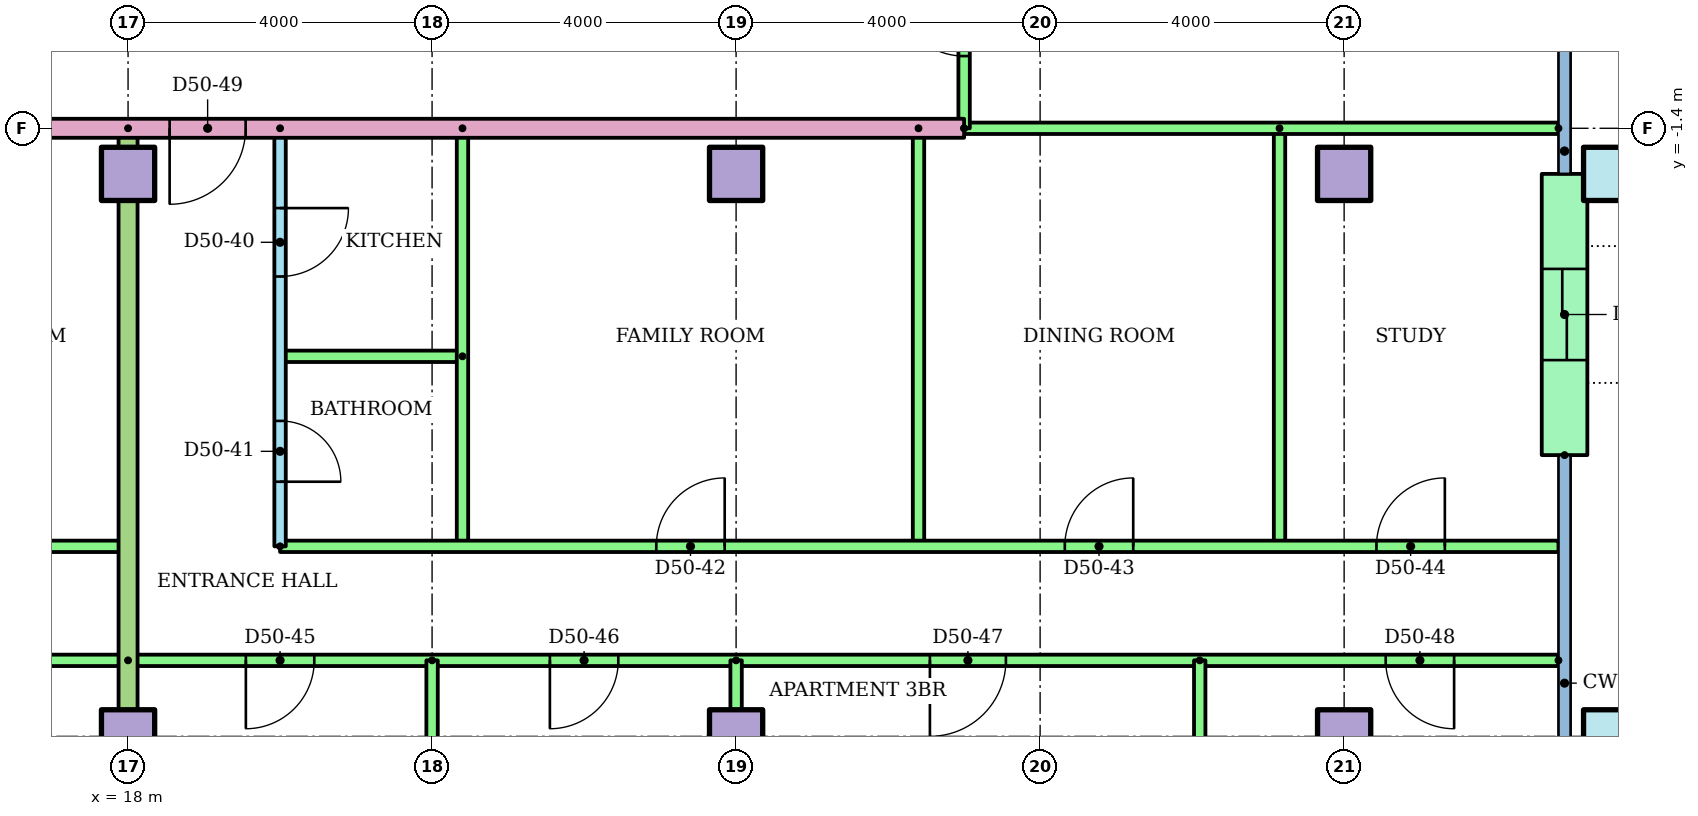
"""IFC4 building model, lengths in metres.
Left out: names, types, materials, properties, quantities, classifications, styles, units other than length and angle.
Written with IfcOpenShell. Run it as: python <this file> out.ifc"""

import sys

from ifc_helpers import new_model, si_unit, direction, frame, frame_2d, origin, origin_2d, place, context, subcontext, project, spatial, rectangle, hollow_rectangle, extrude, element, fill, save


model = new_model("IFC4")
c1 = context("Model", 3, precision=1e-05, world=origin(), true_north=direction((0.0, 1.0)))
c2 = subcontext(c1, "Body", "Model", "MODEL_VIEW")
j1 = project(units=[si_unit("LENGTHUNIT", "METRE"), si_unit("PLANEANGLEUNIT", "RADIAN")], contexts=[c1])
p1 = place(None, origin())
s1 = spatial("IfcSite", under=j1, at=p1, CompositionType="ELEMENT")
p2 = place(p1, origin())
s2 = spatial("IfcBuilding", under=s1, at=p2, CompositionType="ELEMENT")
p3 = place(p2, frame((0.0, 0.0, 190.9)))
s3 = spatial("IfcBuildingStorey", under=s2, at=p3, CompositionType="ELEMENT", Elevation=190.9)
for number, where in (
    (1, (18.0, -9.4, 0.0)),
    (2, (26.0, -9.4, 0.0)),
    (3, (34.0, -9.4, 0.0)),
):
    element("IfcColumn", number, at=place(p3, frame(where)), inside=s3, PredefinedType="COLUMN", context=c2, shape_type="SweptSolid", body=[
        extrude(rectangle(XDim=0.7, YDim=0.7, at=origin_2d()), origin(), (0.0, 0.0, 1.0), 3.2),
    ])
p4 = place(p3, frame((37.5, -9.4, 0.0)))
e4 = element("IfcColumn", 4, at=p4, inside=s3, PredefinedType="COLUMN", context=c2, shape_type="SweptSolid", body=[
    extrude(hollow_rectangle(XDim=0.7, YDim=0.7, WallThickness=0.036, at=origin_2d()), origin(), (0.0, 0.0, 1.0), 3.2),
])
for number, where in (
    (5, (18.0, -2.0, 0.0)),
    (6, (26.0, -2.0, 0.0)),
    (7, (34.0, -2.0, 0.0)),
):
    element("IfcColumn", number, at=place(p3, frame(where)), inside=s3, PredefinedType="COLUMN", context=c2, shape_type="SweptSolid", body=[
        extrude(rectangle(XDim=0.7, YDim=0.7, at=origin_2d()), origin(), (0.0, 0.0, 1.0), 3.2),
    ])
p5 = place(p3, frame((37.5, -2.0, 0.0)))
e8 = element("IfcColumn", 8, at=p5, inside=s3, PredefinedType="COLUMN", context=c2, shape_type="SweptSolid", body=[
    extrude(hollow_rectangle(XDim=0.7, YDim=0.7, WallThickness=0.036, at=origin_2d()), origin(), (0.0, 0.0, 1.0), 3.2),
])
p6 = place(p3, frame((36.9, -5.7, 0.0), z_axis=(0.0, 0.0, 1.0), x_axis=(0.0, 1.0, 0.0)))
e9 = element("IfcWall", 9, at=p6, inside=s3, PredefinedType="STANDARD", context=c2, shape_type="SweptSolid", body=[
    extrude(rectangle(XDim=3.7, YDim=0.6, at=frame_2d((1.85, 0.0))), origin(), (0.0, 0.0, 1.0), 2.8),
])
p7 = place(p6, frame((1.25, 0.0, 0.0)))
e10 = element("IfcOpeningElement", 10, at=p7, cuts=e9, PredefinedType="OPENING", context=c2, shape_type="SweptSolid", body=[
    extrude(rectangle(XDim=1.2, YDim=2.1, at=frame_2d((0.6, 1.05))), frame((0.0, 0.31, 0.0), z_axis=(0.0, -1.0, 0.0), x_axis=(1.0, 0.0, 0.0)), (0.0, 0.0, 1.0), 0.62),
])
p8 = place(p3, frame((12.0, -6.9, 0.0)))
e11 = element("IfcWall", 11, at=p8, inside=s3, PredefinedType="PARTITIONING", context=c2, shape_type="SweptSolid", body=[
    extrude(rectangle(XDim=6.0, YDim=0.15, at=frame_2d((3.0, 0.0))), origin(), (0.0, 0.0, 1.0), 2.4),
])
p9 = place(p8, frame((3.75, 0.0, 0.0)))
e12 = element("IfcOpeningElement", 12, at=p9, cuts=e11, PredefinedType="OPENING", context=c2, shape_type="SweptSolid", body=[
    extrude(rectangle(XDim=0.9, YDim=2.1, at=frame_2d((0.45, 1.05))), frame((0.0, 0.085, 0.0), z_axis=(0.0, -1.0, 0.0), x_axis=(1.0, 0.0, 0.0)), (0.0, 0.0, 1.0), 0.17),
])
p10 = place(p3, frame((18.0, -8.4, 0.0), z_axis=(0.0, 0.0, 1.0), x_axis=(-1.0, 0.0, 0.0)))
e13 = element("IfcWall", 13, at=p10, inside=s3, PredefinedType="PARTITIONING", context=c2, shape_type="SweptSolid", body=[
    extrude(rectangle(XDim=8.0, YDim=0.15, at=frame_2d((4.0, 0.0))), origin(), (0.0, 0.0, 1.0), 2.4),
])
p11 = place(p10, frame((5.5, 0.0, 0.0)))
e14 = element("IfcOpeningElement", 14, at=p11, cuts=e13, PredefinedType="OPENING", context=c2, shape_type="SweptSolid", body=[
    extrude(rectangle(XDim=1.0, YDim=2.1, at=frame_2d((0.5, 1.05))), frame((0.0, 0.085, 0.0), z_axis=(0.0, -1.0, 0.0), x_axis=(1.0, 0.0, 0.0)), (0.0, 0.0, 1.0), 0.17),
])
p12 = place(p10, frame((1.5, 0.0, 0.0)))
e15 = element("IfcOpeningElement", 15, at=p12, cuts=e13, PredefinedType="OPENING", context=c2, shape_type="SweptSolid", body=[
    extrude(rectangle(XDim=1.0, YDim=2.1, at=frame_2d((0.5, 1.05))), frame((0.0, 0.085, 0.0), z_axis=(0.0, -1.0, 0.0), x_axis=(1.0, 0.0, 0.0)), (0.0, 0.0, 1.0), 0.17),
])
p13 = place(p3, frame((20.0, -1.4, 0.0), z_axis=(0.0, 0.0, 1.0), x_axis=(0.0, -1.0, 0.0)))
e16 = element("IfcWall", 16, at=p13, inside=s3, PredefinedType="PARTITIONING", context=c2, shape_type="SweptSolid", body=[
    extrude(rectangle(XDim=5.5, YDim=0.15, at=frame_2d((2.75, 0.0))), origin(), (0.0, 0.0, 1.0), 2.4),
])
p14 = place(p13, frame((1.05, 0.0, 0.0)))
e17 = element("IfcOpeningElement", 17, at=p14, cuts=e16, PredefinedType="OPENING", context=c2, shape_type="SweptSolid", body=[
    extrude(rectangle(XDim=0.9, YDim=2.1, at=frame_2d((0.45, 1.05))), frame((0.0, 0.085, 0.0), z_axis=(0.0, -1.0, 0.0), x_axis=(1.0, 0.0, 0.0)), (0.0, 0.0, 1.0), 0.17),
])
p15 = place(p13, frame((3.85, 0.0, 0.0)))
e18 = element("IfcOpeningElement", 18, at=p15, cuts=e16, PredefinedType="OPENING", context=c2, shape_type="SweptSolid", body=[
    extrude(rectangle(XDim=0.8, YDim=2.1, at=frame_2d((0.4, 1.05))), frame((0.0, 0.085, 0.0), z_axis=(0.0, -1.0, 0.0), x_axis=(1.0, 0.0, 0.0)), (0.0, 0.0, 1.0), 0.17),
])
p16 = place(p3, frame((22.4, -4.4, 0.0), z_axis=(0.0, 0.0, 1.0), x_axis=(-1.0, 0.0, 0.0)))
e19 = element("IfcWall", 19, at=p16, inside=s3, PredefinedType="PARTITIONING", context=c2, shape_type="SweptSolid", body=[
    extrude(rectangle(XDim=2.4, YDim=0.15, at=frame_2d((1.2, 0.0))), origin(), (0.0, 0.0, 1.0), 2.4),
])
for number, where, z_axis, x_axis in (
    (20, (22.4, -1.4, 0.0), (0.0, 0.0, 1.0), (0.0, -1.0, 0.0)),
    (21, (28.4, -1.4, 0.0), (0.0, 0.0, 1.0), (0.0, -1.0, 0.0)),
    (22, (33.15, -1.4, 0.0), (0.0, 0.0, 1.0), (0.0, -1.0, 0.0)),
):
    element("IfcWall", number, at=place(p3, frame(where, z_axis=z_axis, x_axis=x_axis)), inside=s3, PredefinedType="PARTITIONING", context=c2, shape_type="SweptSolid", body=[
        extrude(rectangle(XDim=5.5, YDim=0.15, at=frame_2d((2.75, 0.0))), origin(), (0.0, 0.0, 1.0), 2.4),
    ])
p17 = place(p3, frame((20.0, -6.9, 0.0)))
e23 = element("IfcWall", 23, at=p17, inside=s3, PredefinedType="PARTITIONING", context=c2, shape_type="SweptSolid", body=[
    extrude(rectangle(XDim=16.82, YDim=0.15, at=frame_2d((8.41, 0.0))), origin(), (0.0, 0.0, 1.0), 2.4),
])
p18 = place(p17, frame((4.95, 0.0, 0.0)))
e24 = element("IfcOpeningElement", 24, at=p18, cuts=e23, PredefinedType="OPENING", context=c2, shape_type="SweptSolid", body=[
    extrude(rectangle(XDim=0.9, YDim=2.1, at=frame_2d((0.45, 1.05))), frame((0.0, 0.085, 0.0), z_axis=(0.0, -1.0, 0.0), x_axis=(1.0, 0.0, 0.0)), (0.0, 0.0, 1.0), 0.17),
])
p19 = place(p17, frame((10.325, 0.0, 0.0)))
e25 = element("IfcOpeningElement", 25, at=p19, cuts=e23, PredefinedType="OPENING", context=c2, shape_type="SweptSolid", body=[
    extrude(rectangle(XDim=0.9, YDim=2.1, at=frame_2d((0.45, 1.05))), frame((0.0, 0.085, 0.0), z_axis=(0.0, -1.0, 0.0), x_axis=(1.0, 0.0, 0.0)), (0.0, 0.0, 1.0), 0.17),
])
p20 = place(p17, frame((14.425, 0.0, 0.0)))
e26 = element("IfcOpeningElement", 26, at=p20, cuts=e23, PredefinedType="OPENING", context=c2, shape_type="SweptSolid", body=[
    extrude(rectangle(XDim=0.9, YDim=2.1, at=frame_2d((0.45, 1.05))), frame((0.0, 0.085, 0.0), z_axis=(0.0, -1.0, 0.0), x_axis=(1.0, 0.0, 0.0)), (0.0, 0.0, 1.0), 0.17),
])
p21 = place(p3, frame((36.82, -8.4, 0.0), z_axis=(0.0, 0.0, 1.0), x_axis=(-1.0, 0.0, 0.0)))
e27 = element("IfcWall", 27, at=p21, inside=s3, PredefinedType="PARTITIONING", context=c2, shape_type="SweptSolid", body=[
    extrude(rectangle(XDim=18.82, YDim=0.15, at=frame_2d((9.41, 0.0))), origin(), (0.0, 0.0, 1.0), 2.4),
])
p22 = place(p21, frame((16.37, 0.0, 0.0)))
e28 = element("IfcOpeningElement", 28, at=p22, cuts=e27, PredefinedType="OPENING", context=c2, shape_type="SweptSolid", body=[
    extrude(rectangle(XDim=0.9, YDim=2.1, at=frame_2d((0.45, 1.05))), frame((0.0, 0.085, 0.0), z_axis=(0.0, -1.0, 0.0), x_axis=(1.0, 0.0, 0.0)), (0.0, 0.0, 1.0), 0.17),
])
p23 = place(p21, frame((12.37, 0.0, 0.0)))
e29 = element("IfcOpeningElement", 29, at=p23, cuts=e27, PredefinedType="OPENING", context=c2, shape_type="SweptSolid", body=[
    extrude(rectangle(XDim=0.9, YDim=2.1, at=frame_2d((0.45, 1.05))), frame((0.0, 0.085, 0.0), z_axis=(0.0, -1.0, 0.0), x_axis=(1.0, 0.0, 0.0)), (0.0, 0.0, 1.0), 0.17),
])
p24 = place(p21, frame((7.27, 0.0, 0.0)))
e30 = element("IfcOpeningElement", 30, at=p24, cuts=e27, PredefinedType="OPENING", context=c2, shape_type="SweptSolid", body=[
    extrude(rectangle(XDim=1.0, YDim=2.1, at=frame_2d((0.5, 1.05))), frame((0.0, 0.085, 0.0), z_axis=(0.0, -1.0, 0.0), x_axis=(1.0, 0.0, 0.0)), (0.0, 0.0, 1.0), 0.17),
])
p25 = place(p21, frame((1.373, 0.0, 0.0)))
e31 = element("IfcOpeningElement", 31, at=p25, cuts=e27, PredefinedType="OPENING", context=c2, shape_type="SweptSolid", body=[
    extrude(rectangle(XDim=0.9, YDim=2.1, at=frame_2d((0.45, 1.05))), frame((0.0, 0.085, 0.0), z_axis=(0.0, -1.0, 0.0), x_axis=(1.0, 0.0, 0.0)), (0.0, 0.0, 1.0), 0.17),
])
p26 = place(p3, frame((22.0, -8.4, 0.0), z_axis=(0.0, 0.0, 1.0), x_axis=(0.0, -1.0, 0.0)))
e32 = element("IfcWall", 32, at=p26, inside=s3, PredefinedType="PARTITIONING", context=c2, shape_type="SweptSolid", body=[
    extrude(rectangle(XDim=8.021, YDim=0.15, at=frame_2d((4.01, 0.0))), origin(), (0.0, 0.0, 1.0), 2.4),
])
p27 = place(p3, frame((26.0, -8.4, 0.0), z_axis=(0.0, 0.0, 1.0), x_axis=(0.0, -1.0, 0.0)))
e33 = element("IfcWall", 33, at=p27, inside=s3, PredefinedType="PARTITIONING", context=c2, shape_type="SweptSolid", body=[
    extrude(rectangle(XDim=8.01, YDim=0.15, at=frame_2d((4.005, 0.0))), origin(), (0.0, 0.0, 1.0), 2.4),
])
p28 = place(p3, frame((32.1, -8.4, 0.0), z_axis=(0.0, 0.0, 1.0), x_axis=(0.0, -1.0, 0.0)))
e34 = element("IfcWall", 34, at=p28, inside=s3, PredefinedType="PARTITIONING", context=c2, shape_type="SweptSolid", body=[
    extrude(rectangle(XDim=6.22, YDim=0.15, at=frame_2d((3.11, 0.0))), origin(), (0.0, 0.0, 1.0), 2.4),
])
p29 = place(p3, frame((18.0, -1.4, 0.0), z_axis=(0.0, 0.0, 1.0), x_axis=(0.0, -1.0, 0.0)))
e35 = element("IfcWall", 35, at=p29, inside=s3, PredefinedType="PARTITIONING", context=c2, shape_type="SweptSolid", body=[
    extrude(rectangle(XDim=15.01, YDim=0.25, at=frame_2d((7.505, 0.0))), origin(), (0.0, 0.0, 1.0), 2.4),
])
p30 = place(p3, frame((29.0, -1.4, 0.0), z_axis=(0.0, 0.0, 1.0), x_axis=(-1.0, 0.0, 0.0)))
e36 = element("IfcWall", 36, at=p30, inside=s3, PredefinedType="PARTITIONING", context=c2, shape_type="SweptSolid", body=[
    extrude(rectangle(XDim=15.0, YDim=0.25, at=frame_2d((7.5, 0.0))), origin(), (0.0, 0.0, 1.0), 2.4),
])
p31 = place(p30, frame((9.453, 0.0, 0.0)))
e37 = element("IfcOpeningElement", 37, at=p31, cuts=e36, PredefinedType="OPENING", context=c2, shape_type="SweptSolid", body=[
    extrude(rectangle(XDim=1.0, YDim=2.1, at=frame_2d((0.5, 1.05))), frame((0.0, 0.135, 0.0), z_axis=(0.0, -1.0, 0.0), x_axis=(1.0, 0.0, 0.0)), (0.0, 0.0, 1.0), 0.27),
])
p32 = place(p3, frame((36.82, -1.4, 0.0), z_axis=(0.0, 0.0, 1.0), x_axis=(-1.0, 0.0, 0.0)))
e38 = element("IfcWall", 38, at=p32, inside=s3, PredefinedType="PARTITIONING", context=c2, shape_type="SweptSolid", body=[
    extrude(rectangle(XDim=7.82, YDim=0.15, at=frame_2d((3.91, 0.0))), origin(), (0.0, 0.0, 1.0), 2.4),
])
p33 = place(p3, frame((29.0, -1.4, 0.0), z_axis=(0.0, 0.0, 1.0), x_axis=(0.0, 1.0, 0.0)))
e39 = element("IfcWall", 39, at=p33, inside=s3, PredefinedType="PARTITIONING", context=c2, shape_type="SweptSolid", body=[
    extrude(rectangle(XDim=2.8, YDim=0.15, at=frame_2d((1.4, 0.0))), origin(), (0.0, 0.0, 1.0), 2.4),
])
p34 = place(p33, frame((0.95, 0.0, 0.0)))
e40 = element("IfcOpeningElement", 40, at=p34, cuts=e39, PredefinedType="OPENING", context=c2, shape_type="SweptSolid", body=[
    extrude(rectangle(XDim=0.9, YDim=2.1, at=frame_2d((0.45, 1.05))), frame((0.0, 0.085, 0.0), z_axis=(0.0, -1.0, 0.0), x_axis=(1.0, 0.0, 0.0)), (0.0, 0.0, 1.0), 0.17),
])
p35 = place(p14, origin())
e41 = element("IfcDoor", 41, at=p35, inside=s3, OperationType="SINGLE_SWING_LEFT", PredefinedType="DOOR", context=c2, shape_type="SweptSolid", body=[
    extrude(rectangle(XDim=0.9, YDim=2.1, at=frame_2d((0.45, 1.05))), frame((0.0, 0.025, 0.0), z_axis=(0.0, -1.0, 0.0), x_axis=(1.0, 0.0, 0.0)), (0.0, 0.0, 1.0), 0.05),
])
fill(e17, e41)
p36 = place(p15, origin())
e42 = element("IfcDoor", 42, at=p36, inside=s3, OperationType="SINGLE_SWING_RIGHT", PredefinedType="DOOR", context=c2, shape_type="SweptSolid", body=[
    extrude(rectangle(XDim=0.8, YDim=2.1, at=frame_2d((0.4, 1.05))), frame((0.0, 0.025, 0.0), z_axis=(0.0, -1.0, 0.0), x_axis=(1.0, 0.0, 0.0)), (0.0, 0.0, 1.0), 0.05),
])
fill(e18, e42)
p37 = place(p18, origin())
e43 = element("IfcDoor", 43, at=p37, inside=s3, OperationType="SINGLE_SWING_RIGHT", PredefinedType="DOOR", context=c2, shape_type="SweptSolid", body=[
    extrude(rectangle(XDim=0.9, YDim=2.1, at=frame_2d((0.45, 1.05))), frame((0.0, 0.025, 0.0), z_axis=(0.0, -1.0, 0.0), x_axis=(1.0, 0.0, 0.0)), (0.0, 0.0, 1.0), 0.05),
])
fill(e24, e43)
p38 = place(p19, origin())
e44 = element("IfcDoor", 44, at=p38, inside=s3, OperationType="SINGLE_SWING_RIGHT", PredefinedType="DOOR", context=c2, shape_type="SweptSolid", body=[
    extrude(rectangle(XDim=0.9, YDim=2.1, at=frame_2d((0.45, 1.05))), frame((0.0, 0.025, 0.0), z_axis=(0.0, -1.0, 0.0), x_axis=(1.0, 0.0, 0.0)), (0.0, 0.0, 1.0), 0.05),
])
fill(e25, e44)
p39 = place(p20, origin())
e45 = element("IfcDoor", 45, at=p39, inside=s3, OperationType="SINGLE_SWING_RIGHT", PredefinedType="DOOR", context=c2, shape_type="SweptSolid", body=[
    extrude(rectangle(XDim=0.9, YDim=2.1, at=frame_2d((0.45, 1.05))), frame((0.0, 0.025, 0.0), z_axis=(0.0, -1.0, 0.0), x_axis=(1.0, 0.0, 0.0)), (0.0, 0.0, 1.0), 0.05),
])
fill(e26, e45)
p40 = place(p22, origin())
e46 = element("IfcDoor", 46, at=p40, inside=s3, OperationType="SINGLE_SWING_RIGHT", PredefinedType="DOOR", context=c2, shape_type="SweptSolid", body=[
    extrude(rectangle(XDim=0.9, YDim=2.1, at=frame_2d((0.45, 1.05))), frame((0.0, 0.025, 0.0), z_axis=(0.0, -1.0, 0.0), x_axis=(1.0, 0.0, 0.0)), (0.0, 0.0, 1.0), 0.05),
])
fill(e28, e46)
p41 = place(p23, origin())
e47 = element("IfcDoor", 47, at=p41, inside=s3, OperationType="SINGLE_SWING_RIGHT", PredefinedType="DOOR", context=c2, shape_type="SweptSolid", body=[
    extrude(rectangle(XDim=0.9, YDim=2.1, at=frame_2d((0.45, 1.05))), frame((0.0, 0.025, 0.0), z_axis=(0.0, -1.0, 0.0), x_axis=(1.0, 0.0, 0.0)), (0.0, 0.0, 1.0), 0.05),
])
fill(e29, e47)
p42 = place(p24, origin())
e48 = element("IfcDoor", 48, at=p42, inside=s3, OperationType="SINGLE_SWING_RIGHT", PredefinedType="DOOR", context=c2, shape_type="SweptSolid", body=[
    extrude(rectangle(XDim=1.0, YDim=2.1, at=frame_2d((0.5, 1.05))), frame((0.0, 0.025, 0.0), z_axis=(0.0, -1.0, 0.0), x_axis=(1.0, 0.0, 0.0)), (0.0, 0.0, 1.0), 0.05),
])
fill(e30, e48)
p43 = place(p25, origin())
e49 = element("IfcDoor", 49, at=p43, inside=s3, OperationType="SINGLE_SWING_LEFT", PredefinedType="DOOR", context=c2, shape_type="SweptSolid", body=[
    extrude(rectangle(XDim=0.9, YDim=2.1, at=frame_2d((0.45, 1.05))), frame((0.0, 0.025, 0.0), z_axis=(0.0, -1.0, 0.0), x_axis=(1.0, 0.0, 0.0)), (0.0, 0.0, 1.0), 0.05),
])
fill(e31, e49)
p44 = place(p31, origin())
e50 = element("IfcDoor", 50, at=p44, inside=s3, OperationType="SINGLE_SWING_RIGHT", PredefinedType="DOOR", context=c2, shape_type="SweptSolid", body=[
    extrude(rectangle(XDim=1.0, YDim=2.1, at=frame_2d((0.5, 1.05))), frame((0.0, 0.025, 0.0), z_axis=(0.0, -1.0, 0.0), x_axis=(1.0, 0.0, 0.0)), (0.0, 0.0, 1.0), 0.05),
])
fill(e37, e50)
p45 = place(p34, origin())
e51 = element("IfcDoor", 51, at=p45, inside=s3, OperationType="SINGLE_SWING_RIGHT", PredefinedType="DOOR", context=c2, shape_type="SweptSolid", body=[
    extrude(rectangle(XDim=0.9, YDim=2.1, at=frame_2d((0.45, 1.05))), frame((0.0, 0.025, 0.0), z_axis=(0.0, -1.0, 0.0), x_axis=(1.0, 0.0, 0.0)), (0.0, 0.0, 1.0), 0.05),
])
fill(e40, e51)
p46 = place(p7, origin())
e52 = element("IfcDoor", 52, at=p46, inside=s3, OperationType="SLIDING_TO_LEFT", PredefinedType="DOOR", context=c2, shape_type="SweptSolid", body=[
    extrude(rectangle(XDim=1.2, YDim=2.1, at=frame_2d((0.6, 1.05))), frame((0.0, 0.025, 0.0), z_axis=(0.0, -1.0, 0.0), x_axis=(1.0, 0.0, 0.0)), (0.0, 0.0, 1.0), 0.05),
])
fill(e10, e52)
save(model, sys.argv[1])
